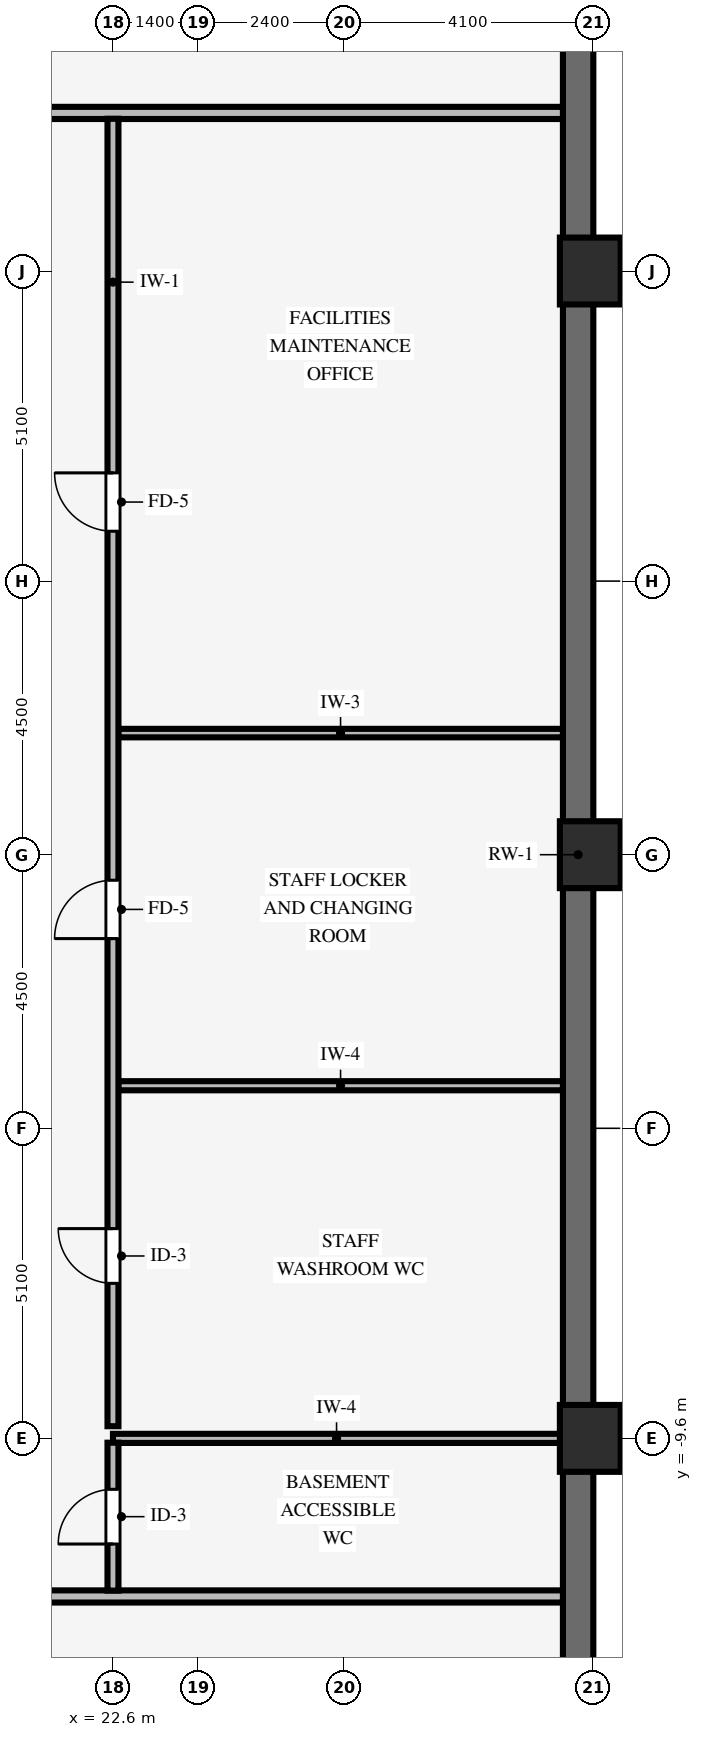
"""IFC4 building model, lengths in metres.
Left out: names, types, materials, properties, quantities, classifications, styles, units other than length and angle.
Written with IfcOpenShell. Run it as: python <this file> out.ifc"""

import sys

from ifc_helpers import new_model, si_unit, direction, frame, frame_2d, origin, origin_2d, place, context, subcontext, project, spatial, rectangle, extrude, source, transform, mapped, element, fill, save


model = new_model("IFC4")
c1 = context("Model", 3, precision=1e-05, world=origin(), true_north=direction((0.0, 1.0)))
c2 = subcontext(c1, "Body", "Model", "MODEL_VIEW")
j1 = project(units=[si_unit("LENGTHUNIT", "METRE"), si_unit("PLANEANGLEUNIT", "RADIAN")], contexts=[c1])
p1 = place(None, origin())
s1 = spatial("IfcSite", under=j1, at=p1, CompositionType="ELEMENT")
p2 = place(p1, origin())
s2 = spatial("IfcBuilding", under=s1, at=p2, CompositionType="ELEMENT")
p3 = place(p2, frame((0.0, 0.0, -4.2)))
s3 = spatial("IfcBuildingStorey", under=s2, at=p3, CompositionType="ELEMENT", Elevation=-4.2)
p4 = place(p3, frame((30.25, -25.505, 0.0), z_axis=(0.0, 0.0, 1.0), x_axis=(0.0, 1.0, 0.0)))
e1 = element("IfcWall", 1, at=p4, inside=s3, PredefinedType="SOLIDWALL", context=c2, shape_type="SweptSolid", body=[
    extrude(rectangle(XDim=51.01, YDim=0.5, at=frame_2d((25.505, 0.0))), origin(), (0.0, 0.0, 1.0), 3.88),
])
for number, where, z_axis, x_axis in (
    (2, (30.5, -9.6, 0.0), (0.0, 0.0, 1.0), (1.0, 0.0, 0.0)),
    (3, (30.5, 0.0, 0.0), (0.0, 0.0, 1.0), (1.0, 0.0, 0.0)),
    (4, (30.5, 9.6, 0.0), (0.0, 0.0, 1.0), (1.0, 0.0, 0.0)),
):
    element("IfcColumn", number, at=place(p3, frame(where, z_axis=z_axis, x_axis=x_axis)), inside=s3, PredefinedType="COLUMN", context=c2, shape_type="SweptSolid", body=[
        extrude(rectangle(XDim=1.1, YDim=1.1, at=origin_2d()), origin(), (0.0, 0.0, 1.0), 3.88),
    ])
p5 = place(p3, frame((-30.0, -12.2, 0.0), z_axis=(0.0, 0.0, 1.0), x_axis=(1.0, 0.0, 0.0)))
e5 = element("IfcWall", 5, at=p5, inside=s3, PredefinedType="STANDARD", context=c2, shape_type="SweptSolid", body=[
    extrude(rectangle(XDim=60.0, YDim=0.2, at=frame_2d((30.0, 0.0))), origin(), (0.0, 0.0, 1.0), 3.87),
])
p6 = place(p5, frame((15.12, 0.0, 0.0)))
e6 = element("IfcOpeningElement", 6, at=p6, cuts=e5, PredefinedType="OPENING", context=c2, shape_type="SweptSolid", body=[
    extrude(rectangle(XDim=0.96, YDim=2.1, at=frame_2d((0.48, 1.05))), frame((0.0, 0.11, 0.0), z_axis=(0.0, -1.0, 0.0), x_axis=(1.0, 0.0, 0.0)), (0.0, 0.0, 1.0), 0.22),
])
p7 = place(p5, frame((43.92, 0.0, 0.0)))
e7 = element("IfcOpeningElement", 7, at=p7, cuts=e5, PredefinedType="OPENING", context=c2, shape_type="SweptSolid", body=[
    extrude(rectangle(XDim=0.96, YDim=2.1, at=frame_2d((0.48, 1.05))), frame((0.0, 0.11, 0.0), z_axis=(0.0, -1.0, 0.0), x_axis=(1.0, 0.0, 0.0)), (0.0, 0.0, 1.0), 0.22),
])
p8 = place(p3, frame((22.6, -9.6, 0.0), z_axis=(0.0, 0.0, 1.0), x_axis=(1.0, 0.0, 0.0)))
e8 = element("IfcWall", 8, at=p8, inside=s3, PredefinedType="PARTITIONING", context=c2, shape_type="SweptSolid", body=[
    extrude(rectangle(XDim=7.354, YDim=0.15, at=frame_2d((3.677, 0.0))), origin(), (0.0, 0.0, 1.0), 3.249),
])
p9 = place(p3, frame((22.686, -3.8, 0.0), z_axis=(0.0, 0.0, 1.0), x_axis=(1.0, 0.0, 0.0)))
e9 = element("IfcWall", 9, at=p9, inside=s3, PredefinedType="PARTITIONING", context=c2, shape_type="SweptSolid", body=[
    extrude(rectangle(XDim=7.314, YDim=0.15, at=frame_2d((3.657, 0.0))), origin(), (0.0, 0.0, 1.0), 3.87),
])
p10 = place(p3, frame((22.686, 2.0, 0.0), z_axis=(0.0, 0.0, 1.0), x_axis=(1.0, 0.0, 0.0)))
e10 = element("IfcWall", 10, at=p10, inside=s3, PredefinedType="PARTITIONING", context=c2, shape_type="SweptSolid", body=[
    extrude(rectangle(XDim=7.314, YDim=0.14, at=frame_2d((3.657, 0.0))), origin(), (0.0, 0.0, 1.0), 3.87),
])
p11 = place(p3, frame((-30.0, 12.2, 0.0), z_axis=(0.0, 0.0, 1.0), x_axis=(1.0, 0.0, 0.0)))
e11 = element("IfcWall", 11, at=p11, inside=s3, PredefinedType="STANDARD", context=c2, shape_type="SweptSolid", body=[
    extrude(rectangle(XDim=60.0, YDim=0.2, at=frame_2d((30.0, 0.0))), origin(), (0.0, 0.0, 1.0), 3.87),
])
p12 = place(p11, frame((15.12, 0.0, 0.0)))
e12 = element("IfcOpeningElement", 12, at=p12, cuts=e11, PredefinedType="OPENING", context=c2, shape_type="SweptSolid", body=[
    extrude(rectangle(XDim=0.96, YDim=2.1, at=frame_2d((0.48, 1.05))), frame((0.0, 0.11, 0.0), z_axis=(0.0, -1.0, 0.0), x_axis=(1.0, 0.0, 0.0)), (0.0, 0.0, 1.0), 0.22),
])
p13 = place(p11, frame((43.92, 0.0, 0.0)))
e13 = element("IfcOpeningElement", 13, at=p13, cuts=e11, PredefinedType="OPENING", context=c2, shape_type="SweptSolid", body=[
    extrude(rectangle(XDim=0.96, YDim=2.1, at=frame_2d((0.48, 1.05))), frame((0.0, 0.11, 0.0), z_axis=(0.0, -1.0, 0.0), x_axis=(1.0, 0.0, 0.0)), (0.0, 0.0, 1.0), 0.22),
])
p14 = place(p3, frame((22.6, -12.104, 0.0), z_axis=(0.0, 0.0, 1.0), x_axis=(0.0, 1.0, 0.0)))
e14 = element("IfcWall", 14, at=p14, inside=s3, PredefinedType="PARTITIONING", context=c2, shape_type="SweptSolid", body=[
    extrude(rectangle(XDim=2.433, YDim=0.18, at=frame_2d((1.217, 0.0))), origin(), (0.0, 0.0, 1.0), 3.87),
])
p15 = place(p14, frame((0.767, 0.0, 0.0)))
e15 = element("IfcOpeningElement", 15, at=p15, cuts=e14, PredefinedType="OPENING", context=c2, shape_type="SweptSolid", body=[
    extrude(rectangle(XDim=0.9, YDim=2.1, at=frame_2d((0.45, 1.05))), frame((0.0, 0.1, 0.0), z_axis=(0.0, -1.0, 0.0), x_axis=(1.0, 0.0, 0.0)), (0.0, 0.0, 1.0), 0.2),
])
p16 = place(p3, frame((22.6, -9.4, 0.0), z_axis=(0.0, 0.0, 1.0), x_axis=(0.0, 1.0, 0.0)))
e16 = element("IfcWall", 16, at=p16, inside=s3, PredefinedType="PARTITIONING", context=c2, shape_type="SweptSolid", body=[
    extrude(rectangle(XDim=21.504, YDim=0.18, at=frame_2d((10.752, 0.0))), origin(), (0.0, 0.0, 1.0), 3.87),
])
p17 = place(p16, frame((14.72, 0.0, 0.0)))
e17 = element("IfcOpeningElement", 17, at=p17, cuts=e16, PredefinedType="OPENING", context=c2, shape_type="SweptSolid", body=[
    extrude(rectangle(XDim=0.96, YDim=2.1, at=frame_2d((0.48, 1.05))), frame((0.0, 0.1, 0.0), z_axis=(0.0, -1.0, 0.0), x_axis=(1.0, 0.0, 0.0)), (0.0, 0.0, 1.0), 0.2),
])
p18 = place(p16, frame((8.02, 0.0, 0.0)))
e18 = element("IfcOpeningElement", 18, at=p18, cuts=e16, PredefinedType="OPENING", context=c2, shape_type="SweptSolid", body=[
    extrude(rectangle(XDim=0.96, YDim=2.1, at=frame_2d((0.48, 1.05))), frame((0.0, 0.1, 0.0), z_axis=(0.0, -1.0, 0.0), x_axis=(1.0, 0.0, 0.0)), (0.0, 0.0, 1.0), 0.2),
])
p19 = place(p16, frame((2.35, 0.0, 0.0)))
e19 = element("IfcOpeningElement", 19, at=p19, cuts=e16, PredefinedType="OPENING", context=c2, shape_type="SweptSolid", body=[
    extrude(rectangle(XDim=0.9, YDim=2.1, at=frame_2d((0.45, 1.05))), frame((0.0, 0.1, 0.0), z_axis=(0.0, -1.0, 0.0), x_axis=(1.0, 0.0, 0.0)), (0.0, 0.0, 1.0), 0.2),
])
m1 = source(origin(), c2, "Body", "SweptSolid", [
    extrude(rectangle(XDim=0.96, YDim=2.1, at=frame_2d((0.48, 1.05))), frame((0.0, 0.025, 0.0), z_axis=(0.0, -1.0, 0.0), x_axis=(1.0, 0.0, 0.0)), (0.0, 0.0, 1.0), 0.05),
])
p20 = place(p17, origin())
e20 = element("IfcDoor", 20, at=p20, inside=s3, OperationType="SINGLE_SWING_RIGHT", PredefinedType="DOOR", context=c2, shape_type="MappedRepresentation", body=[
    mapped(m1, transform((0.0, 0.0, 0.0), scale=1.0)),
])
fill(e17, e20)
p21 = place(p18, origin())
e21 = element("IfcDoor", 21, at=p21, inside=s3, OperationType="SINGLE_SWING_LEFT", PredefinedType="DOOR", context=c2, shape_type="MappedRepresentation", body=[
    mapped(m1, transform((0.0, 0.0, 0.0), scale=1.0)),
])
fill(e18, e21)
m2 = source(origin(), c2, "Body", "SweptSolid", [
    extrude(rectangle(XDim=0.9, YDim=2.1, at=frame_2d((0.45, 1.05))), frame((0.0, 0.025, 0.0), z_axis=(0.0, -1.0, 0.0), x_axis=(1.0, 0.0, 0.0)), (0.0, 0.0, 1.0), 0.05),
])
p22 = place(p19, origin())
e22 = element("IfcDoor", 22, at=p22, inside=s3, OperationType="SINGLE_SWING_RIGHT", PredefinedType="DOOR", context=c2, shape_type="MappedRepresentation", body=[
    mapped(m2, transform((0.0, 0.0, 0.0), scale=1.0)),
])
fill(e19, e22)
p23 = place(p15, origin())
e23 = element("IfcDoor", 23, at=p23, inside=s3, OperationType="SINGLE_SWING_LEFT", PredefinedType="DOOR", context=c2, shape_type="MappedRepresentation", body=[
    mapped(m2, transform((0.0, 0.0, 0.0), scale=1.0)),
])
fill(e15, e23)
save(model, sys.argv[1])
